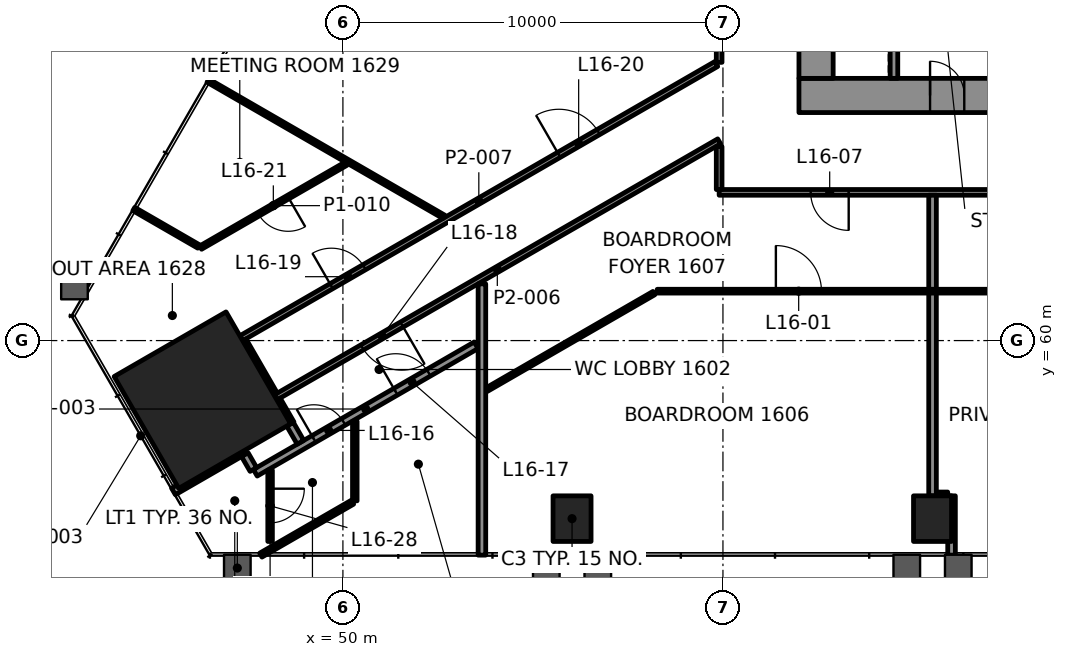
"""IFC4 building model, lengths in metres.
Left out: names, types, materials, properties, quantities, classifications, styles, units other than length and angle.
Written with IfcOpenShell. Run it as: python <this file> out.ifc"""

import sys

from ifc_helpers import new_model, si_unit, direction, frame, frame_2d, origin, origin_2d, place, context, subcontext, project, spatial, rectangle, extrude, element, fill, save


model = new_model("IFC4")
c1 = context("Model", 3, precision=1e-05, world=origin(), true_north=direction((0.0, 1.0)))
c2 = subcontext(c1, "Body", "Model", "MODEL_VIEW")
j1 = project(units=[si_unit("LENGTHUNIT", "METRE"), si_unit("PLANEANGLEUNIT", "RADIAN")], contexts=[c1])
p1 = place(None, origin())
s1 = spatial("IfcSite", under=j1, at=p1, CompositionType="ELEMENT")
p2 = place(p1, origin())
s2 = spatial("IfcBuilding", under=s1, at=p2, CompositionType="ELEMENT")
p3 = place(p2, frame((0.0, 0.0, 73.6)))
s3 = spatial("IfcBuildingStorey", under=s2, at=p3, CompositionType="ELEMENT", Elevation=73.6)
p4 = place(p3, frame((46.303, 58.432, 0.0), z_axis=(0.0, 0.0, 1.0), x_axis=(0.5, -0.866025403784, 0.0)))
e1 = element("IfcColumn", 1, at=p4, inside=s3, PredefinedType="COLUMN", context=c2, shape_type="SweptSolid", body=[
    extrude(rectangle(XDim=3.4, YDim=3.4, at=origin_2d()), origin(), (0.0, 0.0, 1.0), 4.2),
])
for number, where, z_axis, x_axis in (
    (2, (56.029, 55.314, -0.0), (0.0, 0.0, 1.0), (1.0, 0.0, 0.0)),
    (3, (65.515, 55.314, -0.0), (0.0, 0.0, 1.0), (1.0, 0.0, 0.0)),
):
    element("IfcColumn", number, at=place(p3, frame(where, z_axis=z_axis, x_axis=x_axis)), inside=s3, PredefinedType="COLUMN", context=c2, shape_type="SweptSolid", body=[
        extrude(rectangle(XDim=1.0, YDim=1.2, at=origin_2d()), origin(), (0.0, 0.0, 1.0), 4.2),
    ])
p5 = place(p3, frame((62.0, 66.45, 0.0), z_axis=(0.0, 0.0, 1.0), x_axis=(1.0, 0.0, 0.0)))
e4 = element("IfcWall", 4, at=p5, inside=s3, PredefinedType="SHEAR", context=c2, shape_type="SweptSolid", body=[
    extrude(rectangle(XDim=26.0, YDim=0.9, at=frame_2d((13.0, 0.0))), origin(), (0.0, 0.0, 1.0), 4.0),
])
p6 = place(p5, frame((3.45, 0.0, 0.0)))
e5 = element("IfcOpeningElement", 5, at=p6, cuts=e4, PredefinedType="OPENING", context=c2, shape_type="SweptSolid", body=[
    extrude(rectangle(XDim=0.9, YDim=2.1, at=frame_2d((0.45, 1.05))), frame((0.0, 0.46, 0.0), z_axis=(0.0, -1.0, 0.0), x_axis=(1.0, 0.0, 0.0)), (0.0, 0.0, 1.0), 0.92),
])
p7 = place(p5, frame((5.637, 0.0, 0.0)))
e6 = element("IfcOpeningElement", 6, at=p7, cuts=e4, PredefinedType="OPENING", context=c2, shape_type="SweptSolid", body=[
    extrude(rectangle(XDim=0.9, YDim=2.1, at=frame_2d((0.45, 1.05))), frame((0.0, 0.46, 0.0), z_axis=(0.0, -1.0, 0.0), x_axis=(1.0, 0.0, 0.0)), (0.0, 0.0, 1.0), 0.92),
])
p8 = place(p5, frame((7.212, 0.0, 0.0)))
e7 = element("IfcOpeningElement", 7, at=p8, cuts=e4, PredefinedType="OPENING", context=c2, shape_type="SweptSolid", body=[
    extrude(rectangle(XDim=0.9, YDim=2.1, at=frame_2d((0.45, 1.05))), frame((0.0, 0.46, 0.0), z_axis=(0.0, -1.0, 0.0), x_axis=(1.0, 0.0, 0.0)), (0.0, 0.0, 1.0), 0.92),
])
p9 = place(p5, frame((8.999, 0.0, 0.0)))
e8 = element("IfcOpeningElement", 8, at=p9, cuts=e4, PredefinedType="OPENING", context=c2, shape_type="SweptSolid", body=[
    extrude(rectangle(XDim=0.9, YDim=2.1, at=frame_2d((0.45, 1.05))), frame((0.0, 0.46, 0.0), z_axis=(0.0, -1.0, 0.0), x_axis=(1.0, 0.0, 0.0)), (0.0, 0.0, 1.0), 0.92),
])
p10 = place(p5, frame((17.324, 0.0, 0.0)))
e9 = element("IfcOpeningElement", 9, at=p10, cuts=e4, PredefinedType="OPENING", context=c2, shape_type="SweptSolid", body=[
    extrude(rectangle(XDim=0.9, YDim=2.1, at=frame_2d((0.45, 1.05))), frame((0.0, 0.46, 0.0), z_axis=(0.0, -1.0, 0.0), x_axis=(1.0, 0.0, 0.0)), (0.0, 0.0, 1.0), 0.92),
])
p11 = place(p3, frame((62.45, 66.9, 0.0), z_axis=(0.0, 0.0, 1.0), x_axis=(0.0, 1.0, 0.0)))
e10 = element("IfcWall", 10, at=p11, inside=s3, PredefinedType="SHEAR", context=c2, shape_type="SweptSolid", body=[
    extrude(rectangle(XDim=16.2, YDim=0.9, at=frame_2d((8.1, 0.0))), origin(), (0.0, 0.0, 1.0), 4.0),
])
p12 = place(p11, frame((5.5, 0.0, 0.0)))
e11 = element("IfcOpeningElement", 11, at=p12, cuts=e10, PredefinedType="OPENING", context=c2, shape_type="SweptSolid", body=[
    extrude(rectangle(XDim=1.8, YDim=2.1, at=frame_2d((0.9, 1.05))), frame((0.0, 0.46, 0.0), z_axis=(0.0, -1.0, 0.0), x_axis=(1.0, 0.0, 0.0)), (0.0, 0.0, 1.0), 0.92),
])
p13 = place(p3, frame((65.625, 55.914, 0.0), z_axis=(0.0, 0.0, 1.0), x_axis=(1.0, 0.0, 0.0)))
e12 = element("IfcWall", 12, at=p13, inside=s3, PredefinedType="PARTITIONING", context=c2, shape_type="SweptSolid", body=[
    extrude(rectangle(XDim=0.29, YDim=0.2, at=frame_2d((0.145, 0.0))), origin(), (0.0, 0.0, 1.0), 3.4),
])
p14 = place(p3, frame((58.271, 61.3, 0.0), z_axis=(0.0, 0.0, 1.0), x_axis=(1.0, 0.0, 0.0)))
e13 = element("IfcWall", 13, at=p14, inside=s3, PredefinedType="PARTITIONING", context=c2, shape_type="SweptSolid", body=[
    extrude(rectangle(XDim=26.214, YDim=0.1, at=frame_2d((13.107, 0.0))), origin(), (0.0, 0.0, 1.0), 3.4),
])
p15 = place(p14, frame((3.122, 0.0, 0.0)))
e14 = element("IfcOpeningElement", 14, at=p15, cuts=e13, PredefinedType="OPENING", context=c2, shape_type="SweptSolid", body=[
    extrude(rectangle(XDim=1.2, YDim=2.1, at=frame_2d((0.6, 1.05))), frame((0.0, 0.06, 0.0), z_axis=(0.0, -1.0, 0.0), x_axis=(1.0, 0.0, 0.0)), (0.0, 0.0, 1.0), 0.12),
])
p16 = place(p14, frame((9.957, 0.0, 0.0)))
e15 = element("IfcOpeningElement", 15, at=p16, cuts=e13, PredefinedType="OPENING", context=c2, shape_type="SweptSolid", body=[
    extrude(rectangle(XDim=0.9, YDim=2.1, at=frame_2d((0.45, 1.05))), frame((0.0, 0.06, 0.0), z_axis=(0.0, -1.0, 0.0), x_axis=(1.0, 0.0, 0.0)), (0.0, 0.0, 1.0), 0.12),
])
p17 = place(p14, frame((16.279, 0.0, 0.0)))
e16 = element("IfcOpeningElement", 16, at=p17, cuts=e13, PredefinedType="OPENING", context=c2, shape_type="SweptSolid", body=[
    extrude(rectangle(XDim=0.9, YDim=2.1, at=frame_2d((0.45, 1.05))), frame((0.0, 0.06, 0.0), z_axis=(0.0, -1.0, 0.0), x_axis=(1.0, 0.0, 0.0)), (0.0, 0.0, 1.0), 0.12),
])
p18 = place(p14, frame((22.501, 0.0, 0.0)))
e17 = element("IfcOpeningElement", 17, at=p18, cuts=e13, PredefinedType="OPENING", context=c2, shape_type="SweptSolid", body=[
    extrude(rectangle(XDim=0.9, YDim=2.1, at=frame_2d((0.45, 1.05))), frame((0.0, 0.06, 0.0), z_axis=(0.0, -1.0, 0.0), x_axis=(1.0, 0.0, 0.0)), (0.0, 0.0, 1.0), 0.12),
])
p19 = place(p3, frame((90.099, 63.9, 0.0), z_axis=(0.0, 0.0, 1.0), x_axis=(-1.0, 0.0, 0.0)))
e18 = element("IfcWall", 18, at=p19, inside=s3, PredefinedType="PARTITIONING", context=c2, shape_type="SweptSolid", body=[
    extrude(rectangle(XDim=30.199, YDim=0.15, at=frame_2d((15.1, 0.0))), origin(), (0.0, 0.0, 1.0), 3.4),
])
p20 = place(p19, frame((2.309, 0.0, 0.0)))
e19 = element("IfcOpeningElement", 19, at=p20, cuts=e18, PredefinedType="OPENING", context=c2, shape_type="SweptSolid", body=[
    extrude(rectangle(XDim=1.2, YDim=2.1, at=frame_2d((0.6, 1.05))), frame((0.0, 0.085, 0.0), z_axis=(0.0, -1.0, 0.0), x_axis=(1.0, 0.0, 0.0)), (0.0, 0.0, 1.0), 0.17),
])
p21 = place(p19, frame((14.599, 0.0, 0.0)))
e20 = element("IfcOpeningElement", 20, at=p21, cuts=e18, PredefinedType="OPENING", context=c2, shape_type="SweptSolid", body=[
    extrude(rectangle(XDim=1.0, YDim=2.1, at=frame_2d((0.5, 1.05))), frame((0.0, 0.085, 0.0), z_axis=(0.0, -1.0, 0.0), x_axis=(1.0, 0.0, 0.0)), (0.0, 0.0, 1.0), 0.17),
])
p22 = place(p19, frame((26.791, 0.0, 0.0)))
e21 = element("IfcOpeningElement", 21, at=p22, cuts=e18, PredefinedType="OPENING", context=c2, shape_type="SweptSolid", body=[
    extrude(rectangle(XDim=1.0, YDim=2.1, at=frame_2d((0.5, 1.05))), frame((0.0, 0.085, 0.0), z_axis=(0.0, -1.0, 0.0), x_axis=(1.0, 0.0, 0.0)), (0.0, 0.0, 1.0), 0.17),
])
p23 = place(p3, frame((47.84, 54.354, 0.0), z_axis=(0.0, 0.0, 1.0), x_axis=(0.866007574053, 0.500030880729, 0.0)))
e22 = element("IfcWall", 22, at=p23, inside=s3, PredefinedType="PARTITIONING", context=c2, shape_type="SweptSolid", body=[
    extrude(rectangle(XDim=2.786, YDim=0.12, at=frame_2d((1.393, 0.0))), origin(), (0.0, 0.0, 1.0), 3.4),
])
p24 = place(p3, frame((53.784, 58.71, 0.0), z_axis=(0.0, 0.0, 1.0), x_axis=(0.866049563981, 0.499958150978, 0.0)))
e23 = element("IfcWall", 23, at=p24, inside=s3, PredefinedType="PARTITIONING", context=c2, shape_type="SweptSolid", body=[
    extrude(rectangle(XDim=5.081, YDim=0.1, at=frame_2d((2.541, 0.0))), origin(), (0.0, 0.0, 1.0), 3.4),
])
p25 = place(p3, frame((47.695, 56.521, 0.0), z_axis=(0.0, 0.0, 1.0), x_axis=(0.86602261799, 0.500004825106, 0.0)))
e24 = element("IfcWall", 24, at=p25, inside=s3, PredefinedType="PARTITIONING", context=c2, shape_type="SweptSolid", body=[
    extrude(rectangle(XDim=6.711, YDim=0.2, at=frame_2d((3.355, 0.0))), origin(), (0.0, 0.0, 1.0), 3.4),
])
p26 = place(p25, frame((1.779, 0.0, 0.0)))
e25 = element("IfcOpeningElement", 25, at=p26, cuts=e24, PredefinedType="OPENING", context=c2, shape_type="SweptSolid", body=[
    extrude(rectangle(XDim=0.9, YDim=2.1, at=frame_2d((0.45, 1.05))), frame((0.0, 0.11, 0.0), z_axis=(0.0, -1.0, 0.0), x_axis=(1.0, 0.0, 0.0)), (0.0, 0.0, 1.0), 0.22),
])
p27 = place(p25, frame((4.266, 0.0, 0.0)))
e26 = element("IfcOpeningElement", 26, at=p27, cuts=e24, PredefinedType="OPENING", context=c2, shape_type="SweptSolid", body=[
    extrude(rectangle(XDim=1.0, YDim=2.1, at=frame_2d((0.5, 1.05))), frame((0.0, 0.11, 0.0), z_axis=(0.0, -1.0, 0.0), x_axis=(1.0, 0.0, 0.0)), (0.0, 0.0, 1.0), 0.22),
])
p28 = place(p3, frame((45.542, 56.03, 0.0), z_axis=(0.0, 0.0, 1.0), x_axis=(0.866062227083, 0.499936214752, 0.0)))
e27 = element("IfcWall", 27, at=p28, inside=s3, PredefinedType="PARTITIONING", context=c2, shape_type="SweptSolid", body=[
    extrude(rectangle(XDim=2.109, YDim=0.2, at=frame_2d((1.055, 0.0))), origin(), (0.0, 0.0, 1.0), 3.4),
])
p29 = place(p3, frame((59.9, 65.243, 0.0), z_axis=(0.0, 0.0, 1.0), x_axis=(-0.866023326939, -0.500003597184, 0.0)))
e28 = element("IfcWall", 28, at=p29, inside=s3, PredefinedType="PARTITIONING", context=c2, shape_type="SweptSolid", body=[
    extrude(rectangle(XDim=13.48, YDim=0.15, at=frame_2d((6.74, 0.0))), origin(), (0.0, 0.0, 1.0), 3.247),
])
p30 = place(p29, frame((9.643, 0.0, 0.0)))
e29 = element("IfcOpeningElement", 29, at=p30, cuts=e28, PredefinedType="OPENING", context=c2, shape_type="SweptSolid", body=[
    extrude(rectangle(XDim=1.2, YDim=2.1, at=frame_2d((0.6, 1.05))), frame((0.0, 0.085, 0.0), z_axis=(0.0, -1.0, 0.0), x_axis=(1.0, 0.0, 0.0)), (0.0, 0.0, 1.0), 0.17),
])
p31 = place(p3, frame((47.328, 60.063, 0.0), z_axis=(0.0, 0.0, 1.0), x_axis=(0.86602527873, 0.500000216601, 0.0)))
e30 = element("IfcWall", 30, at=p31, inside=s3, PredefinedType="PARTITIONING", context=c2, shape_type="SweptSolid", body=[
    extrude(rectangle(XDim=14.431, YDim=0.15, at=frame_2d((7.215, 0.0))), origin(), (0.0, 0.0, 1.0), 3.4),
])
p32 = place(p31, frame((2.737, 0.0, 0.0)))
e31 = element("IfcOpeningElement", 31, at=p32, cuts=e30, PredefinedType="OPENING", context=c2, shape_type="SweptSolid", body=[
    extrude(rectangle(XDim=1.0, YDim=2.1, at=frame_2d((0.5, 1.05))), frame((0.0, 0.085, 0.0), z_axis=(0.0, -1.0, 0.0), x_axis=(1.0, 0.0, 0.0)), (0.0, 0.0, 1.0), 0.17),
])
p33 = place(p31, frame((9.649, 0.0, 0.0)))
e32 = element("IfcOpeningElement", 32, at=p33, cuts=e30, PredefinedType="OPENING", context=c2, shape_type="SweptSolid", body=[
    extrude(rectangle(XDim=1.2, YDim=2.1, at=frame_2d((0.6, 1.05))), frame((0.0, 0.085, 0.0), z_axis=(0.0, -1.0, 0.0), x_axis=(1.0, 0.0, 0.0)), (0.0, 0.0, 1.0), 0.17),
])
p34 = place(p3, frame((50.082, 64.655, 0.0), z_axis=(0.0, 0.0, 1.0), x_axis=(-0.866030989016, -0.499990325971, 0.0)))
e33 = element("IfcWall", 33, at=p34, inside=s3, PredefinedType="PARTITIONING", context=c2, shape_type="SweptSolid", body=[
    extrude(rectangle(XDim=4.418, YDim=0.1, at=frame_2d((2.209, 0.0))), origin(), (0.0, 0.0, 1.0), 3.4),
])
p35 = place(p34, frame((1.759, 0.0, 0.0)))
e34 = element("IfcOpeningElement", 34, at=p35, cuts=e33, PredefinedType="OPENING", context=c2, shape_type="SweptSolid", body=[
    extrude(rectangle(XDim=0.9, YDim=2.1, at=frame_2d((0.45, 1.05))), frame((0.0, 0.06, 0.0), z_axis=(0.0, -1.0, 0.0), x_axis=(1.0, 0.0, 0.0)), (0.0, 0.0, 1.0), 0.12),
])
p36 = place(p3, frame((66.015, 54.354, 0.0), z_axis=(0.0, 0.0, 1.0), x_axis=(0.0, 1.0, 0.0)))
e35 = element("IfcWall", 35, at=p36, inside=s3, PredefinedType="PARTITIONING", context=c2, shape_type="SweptSolid", body=[
    extrude(rectangle(XDim=1.56, YDim=0.2, at=frame_2d((0.78, 0.0))), origin(), (0.0, 0.0, 1.0), 3.165),
])
p37 = place(p3, frame((65.515, 55.914, 0.0), z_axis=(0.0, 0.0, 1.0), x_axis=(0.0, 1.0, 0.0)))
e36 = element("IfcWall", 36, at=p37, inside=s3, PredefinedType="PARTITIONING", context=c2, shape_type="SweptSolid", body=[
    extrude(rectangle(XDim=5.336, YDim=0.2, at=frame_2d((2.668, 0.0))), origin(), (0.0, 0.0, 1.0), 3.4),
])
p38 = place(p3, frame((59.9, 63.975, 0.0), z_axis=(0.0, 0.0, 1.0), x_axis=(0.0, 1.0, 0.0)))
e37 = element("IfcWall", 37, at=p38, inside=s3, PredefinedType="PARTITIONING", context=c2, shape_type="SweptSolid", body=[
    extrude(rectangle(XDim=1.131, YDim=0.15, at=frame_2d((0.565, 0.0))), origin(), (0.0, 0.0, 1.0), 3.247),
])
p39 = place(p3, frame((59.9, 67.321, 0.0), z_axis=(0.0, 0.0, 1.0), x_axis=(0.0, 1.0, 0.0)))
e38 = element("IfcWall", 38, at=p39, inside=s3, PredefinedType="PARTITIONING", context=c2, shape_type="SweptSolid", body=[
    extrude(rectangle(XDim=18.778, YDim=0.15, at=frame_2d((9.389, 0.0))), origin(), (0.0, 0.0, 1.0), 3.4),
])
p40 = place(p3, frame((53.658, 54.354, 0.0), z_axis=(0.0, 0.0, 1.0), x_axis=(0.0, 1.0, 0.0)))
e39 = element("IfcWall", 39, at=p40, inside=s3, PredefinedType="PARTITIONING", context=c2, shape_type="SweptSolid", body=[
    extrude(rectangle(XDim=7.138, YDim=0.2, at=frame_2d((3.569, 0.0))), origin(), (0.0, 0.0, 1.0), 3.4),
])
p41 = place(p3, frame((50.313, 55.782, 0.0), z_axis=(0.0, 0.0, 1.0), x_axis=(0.0, 1.0, 0.0)))
e40 = element("IfcWall", 40, at=p41, inside=s3, PredefinedType="PARTITIONING", context=c2, shape_type="SweptSolid", body=[
    extrude(rectangle(XDim=2.096, YDim=0.12, at=frame_2d((1.048, 0.0))), origin(), (0.0, 0.0, 1.0), 3.4),
])
p42 = place(p3, frame((48.084, 56.591, 0.0), z_axis=(0.0, 0.0, 1.0), x_axis=(0.0, -1.0, 0.0)))
e41 = element("IfcWall", 41, at=p42, inside=s3, PredefinedType="PARTITIONING", context=c2, shape_type="SweptSolid", body=[
    extrude(rectangle(XDim=1.877, YDim=0.12, at=frame_2d((0.938, 0.0))), origin(), (0.0, 0.0, 1.0), 3.4),
])
p43 = place(p42, frame((0.488, 0.0, 0.0)))
e42 = element("IfcOpeningElement", 42, at=p43, cuts=e41, PredefinedType="OPENING", context=c2, shape_type="SweptSolid", body=[
    extrude(rectangle(XDim=0.9, YDim=2.1, at=frame_2d((0.45, 1.05))), frame((0.0, 0.07, 0.0), z_axis=(0.0, -1.0, 0.0), x_axis=(1.0, 0.0, 0.0)), (0.0, 0.0, 1.0), 0.14),
])
p44 = place(p3, frame((48.625, 57.81, 0.0), z_axis=(0.0, 0.0, 1.0), x_axis=(-0.500053022251, 0.865994789209, 0.0)))
e43 = element("IfcWall", 43, at=p44, inside=s3, PredefinedType="PARTITIONING", context=c2, shape_type="SweptSolid", body=[
    extrude(rectangle(XDim=0.725, YDim=0.2, at=frame_2d((0.362, 0.0))), origin(), (0.0, 0.0, 1.0), 3.4),
])
p45 = place(p3, frame((48.883, 57.323, 0.0), z_axis=(0.0, 0.0, 1.0), x_axis=(-0.499914787221, 0.866074595816, 0.0)))
e44 = element("IfcWall", 44, at=p45, inside=s3, PredefinedType="PARTITIONING", context=c2, shape_type="SweptSolid", body=[
    extrude(rectangle(XDim=0.549, YDim=0.2, at=frame_2d((0.275, 0.0))), origin(), (0.0, 0.0, 1.0), 3.4),
])
p46 = place(p3, frame((47.644, 56.608, 0.0), z_axis=(0.0, 0.0, 1.0), x_axis=(-0.499644091975, 0.866230789891, 0.0)))
e45 = element("IfcWall", 45, at=p46, inside=s3, PredefinedType="PARTITIONING", context=c2, shape_type="SweptSolid", body=[
    extrude(rectangle(XDim=0.449, YDim=0.2, at=frame_2d((0.225, 0.0))), origin(), (0.0, 0.0, 1.0), 3.4),
])
p47 = place(p3, frame((52.657, 63.256, 0.0), z_axis=(0.0, 0.0, 1.0), x_axis=(-0.866014863173, 0.50001825643, 0.0)))
e46 = element("IfcWall", 46, at=p47, inside=s3, PredefinedType="PARTITIONING", context=c2, shape_type="SweptSolid", body=[
    extrude(rectangle(XDim=7.168, YDim=0.1, at=frame_2d((3.584, 0.0))), origin(), (0.0, 0.0, 1.0), 3.4),
])
p48 = place(p3, frame((46.206, 62.475, 0.0), z_axis=(0.0, 0.0, 1.0), x_axis=(-0.866033041146, 0.499986771468, 0.0)))
e47 = element("IfcWall", 47, at=p48, inside=s3, PredefinedType="PARTITIONING", context=c2, shape_type="SweptSolid", body=[
    extrude(rectangle(XDim=1.972, YDim=0.1, at=frame_2d((0.986, 0.0))), origin(), (0.0, 0.0, 1.0), 3.4),
])
p49 = place(p3, frame((48.187, 58.567, 0.0), z_axis=(0.0, 0.0, 1.0), x_axis=(-0.500013311227, 0.866017718408, 0.0)))
e48 = element("IfcWall", 48, at=p49, inside=s3, PredefinedType="PARTITIONING", context=c2, shape_type="SweptSolid", body=[
    extrude(rectangle(XDim=1.647, YDim=0.2, at=frame_2d((0.823, 0.0))), origin(), (0.0, 0.0, 1.0), 3.247),
])
p50 = place(p3, frame((65.515, 61.35, 0.0), z_axis=(0.0, 0.0, 1.0), x_axis=(0.0, 1.0, 0.0)))
e49 = element("IfcWall", 49, at=p50, inside=s3, PredefinedType="PARTITIONING", context=c2, shape_type="SweptSolid", body=[
    extrude(rectangle(XDim=2.475, YDim=0.2, at=frame_2d((1.237, 0.0))), origin(), (0.0, 0.0, 1.0), 3.4),
])
p51 = place(p3, frame((64.5, 66.9, 0.0), z_axis=(0.0, 0.0, 1.0), x_axis=(0.0, 1.0, 0.0)))
e50 = element("IfcWall", 50, at=p51, inside=s3, PredefinedType="PARTITIONING", context=c2, shape_type="SweptSolid", body=[
    extrude(rectangle(XDim=1.8, YDim=0.2, at=frame_2d((0.9, 0.0))), origin(), (0.0, 0.0, 1.0), 4.0),
])
p52 = place(p15, origin())
e51 = element("IfcDoor", 51, at=p52, inside=s3, OperationType="DOUBLE_DOOR_SINGLE_SWING", PredefinedType="DOOR", context=c2, shape_type="SweptSolid", body=[
    extrude(rectangle(XDim=1.2, YDim=2.1, at=frame_2d((0.6, 1.05))), frame((0.0, 0.025, 0.0), z_axis=(0.0, -1.0, 0.0), x_axis=(1.0, 0.0, 0.0)), (0.0, 0.0, 1.0), 0.05),
])
fill(e14, e51)
p53 = place(p22, origin())
e52 = element("IfcDoor", 52, at=p53, inside=s3, OperationType="SINGLE_SWING_LEFT", PredefinedType="DOOR", context=c2, shape_type="SweptSolid", body=[
    extrude(rectangle(XDim=1.0, YDim=2.1, at=frame_2d((0.5, 1.05))), frame((0.0, 0.025, 0.0), z_axis=(0.0, -1.0, 0.0), x_axis=(1.0, 0.0, 0.0)), (0.0, 0.0, 1.0), 0.05),
])
fill(e21, e52)
p54 = place(p26, origin())
e53 = element("IfcDoor", 53, at=p54, inside=s3, OperationType="SINGLE_SWING_LEFT", PredefinedType="DOOR", context=c2, shape_type="SweptSolid", body=[
    extrude(rectangle(XDim=0.9, YDim=2.1, at=frame_2d((0.45, 1.05))), frame((0.0, 0.025, 0.0), z_axis=(0.0, -1.0, 0.0), x_axis=(1.0, 0.0, 0.0)), (0.0, 0.0, 1.0), 0.05),
])
fill(e25, e53)
p55 = place(p27, origin())
e54 = element("IfcDoor", 54, at=p55, inside=s3, OperationType="SINGLE_SWING_RIGHT", PredefinedType="DOOR", context=c2, shape_type="SweptSolid", body=[
    extrude(rectangle(XDim=1.0, YDim=2.1, at=frame_2d((0.5, 1.05))), frame((0.0, 0.025, 0.0), z_axis=(0.0, -1.0, 0.0), x_axis=(1.0, 0.0, 0.0)), (0.0, 0.0, 1.0), 0.05),
])
fill(e26, e54)
p56 = place(p30, origin())
e55 = element("IfcDoor", 55, at=p56, inside=s3, OperationType="DOUBLE_DOOR_SINGLE_SWING", PredefinedType="DOOR", context=c2, shape_type="SweptSolid", body=[
    extrude(rectangle(XDim=1.2, YDim=2.1, at=frame_2d((0.6, 1.05))), frame((0.0, 0.025, 0.0), z_axis=(0.0, -1.0, 0.0), x_axis=(1.0, 0.0, 0.0)), (0.0, 0.0, 1.0), 0.05),
])
fill(e29, e55)
p57 = place(p32, origin())
e56 = element("IfcDoor", 56, at=p57, inside=s3, OperationType="SINGLE_SWING_LEFT", PredefinedType="DOOR", context=c2, shape_type="SweptSolid", body=[
    extrude(rectangle(XDim=1.0, YDim=2.1, at=frame_2d((0.5, 1.05))), frame((0.0, 0.025, 0.0), z_axis=(0.0, -1.0, 0.0), x_axis=(1.0, 0.0, 0.0)), (0.0, 0.0, 1.0), 0.05),
])
fill(e31, e56)
p58 = place(p33, origin())
e57 = element("IfcDoor", 57, at=p58, inside=s3, OperationType="DOUBLE_DOOR_SINGLE_SWING", PredefinedType="DOOR", context=c2, shape_type="SweptSolid", body=[
    extrude(rectangle(XDim=1.2, YDim=2.1, at=frame_2d((0.6, 1.05))), frame((0.0, 0.025, 0.0), z_axis=(0.0, -1.0, 0.0), x_axis=(1.0, 0.0, 0.0)), (0.0, 0.0, 1.0), 0.05),
])
fill(e32, e57)
p59 = place(p35, origin())
e58 = element("IfcDoor", 58, at=p59, inside=s3, OperationType="SINGLE_SWING_LEFT", PredefinedType="DOOR", context=c2, shape_type="SweptSolid", body=[
    extrude(rectangle(XDim=0.9, YDim=2.1, at=frame_2d((0.45, 1.05))), frame((0.0, 0.025, 0.0), z_axis=(0.0, -1.0, 0.0), x_axis=(1.0, 0.0, 0.0)), (0.0, 0.0, 1.0), 0.05),
])
fill(e34, e58)
p60 = place(p43, origin())
e59 = element("IfcDoor", 59, at=p60, inside=s3, OperationType="SINGLE_SWING_LEFT", PredefinedType="DOOR", context=c2, shape_type="SweptSolid", body=[
    extrude(rectangle(XDim=0.9, YDim=2.1, at=frame_2d((0.45, 1.05))), frame((0.0, 0.025, 0.0), z_axis=(0.0, -1.0, 0.0), x_axis=(1.0, 0.0, 0.0)), (0.0, 0.0, 1.0), 0.05),
])
fill(e42, e59)
p61 = place(p6, origin())
e60 = element("IfcDoor", 60, at=p61, inside=s3, OperationType="SINGLE_SWING_LEFT", PredefinedType="DOOR", context=c2, shape_type="SweptSolid", body=[
    extrude(rectangle(XDim=0.9, YDim=2.1, at=frame_2d((0.45, 1.05))), frame((0.0, 0.17, 0.0), z_axis=(0.0, -1.0, 0.0), x_axis=(1.0, 0.0, 0.0)), (0.0, 0.0, 1.0), 0.34),
])
fill(e5, e60)
save(model, sys.argv[1])
